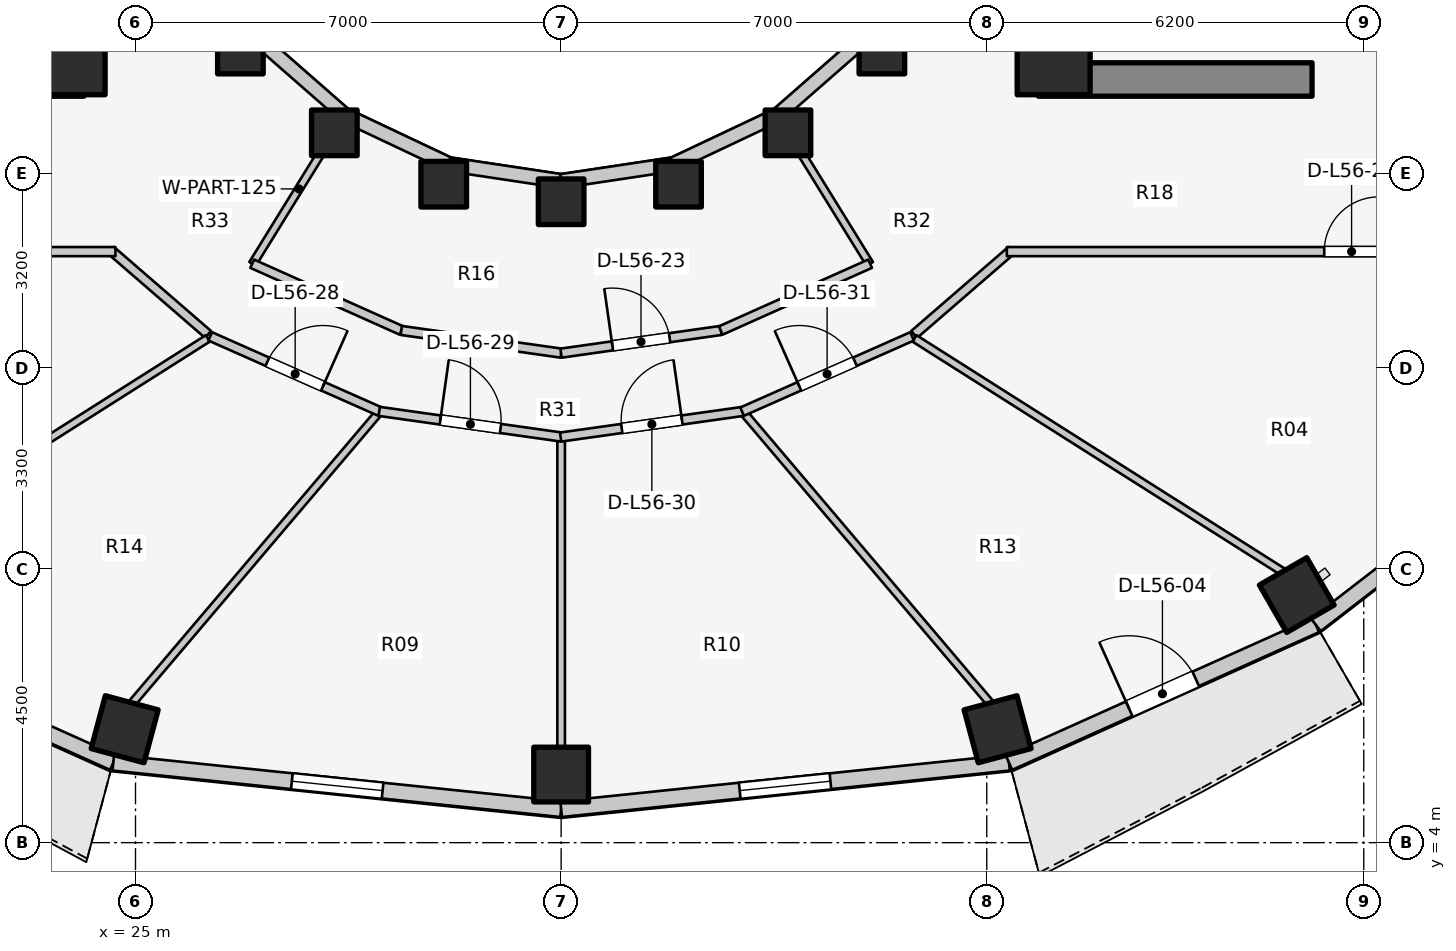
"""IFC4 building model, lengths in metres.
Left out: names, types, materials, properties, quantities, classifications, styles, units other than length and angle.
Written with IfcOpenShell. Run it as: python <this file> out.ifc"""

import sys

from ifc_helpers import new_model, si_unit, direction, frame, frame_2d, origin, origin_2d, place, context, subcontext, project, spatial, rectangle, extrude, element, fill, save


model = new_model("IFC4")
c1 = context("Model", 3, precision=1e-05, world=origin(), true_north=direction((0.0, 1.0)))
c2 = subcontext(c1, "Body", "Model", "MODEL_VIEW")
j1 = project(units=[si_unit("LENGTHUNIT", "METRE"), si_unit("PLANEANGLEUNIT", "RADIAN")], contexts=[c1])
p1 = place(None, origin())
s1 = spatial("IfcSite", under=j1, at=p1, CompositionType="ELEMENT")
p2 = place(p1, origin())
s2 = spatial("IfcBuilding", under=s1, at=p2, CompositionType="ELEMENT")
p3 = place(p2, frame((0.0, 0.0, 183.9)))
s3 = spatial("IfcBuildingStorey", under=s2, at=p3, CompositionType="ELEMENT", Elevation=183.9)
for number, where, z_axis, x_axis in (
    (1, (19.65, 16.55, 0.0), (0.0, 0.0, 1.0), (1.0, 0.0, 0.0)),
    (2, (39.85, 16.55, 0.0), (0.0, 0.0, 1.0), (1.0, 0.0, 0.0)),
):
    element("IfcWall", number, at=place(p3, frame(where, z_axis=z_axis, x_axis=x_axis)), inside=s3, PredefinedType="SHEAR", context=c2, shape_type="SweptSolid", body=[
        extrude(rectangle(XDim=4.5, YDim=0.55, at=frame_2d((2.25, 0.0))), origin(), (0.0, 0.0, 1.0), 3.1),
    ])
for number, where, z_axis, x_axis in (
    (3, (23.9, 16.9, 0.0), (0.0, 0.0, 1.0), (1.0, 0.0, 0.0)),
    (4, (40.1, 16.9, 0.0), (0.0, 0.0, 1.0), (1.0, 0.0, 0.0)),
):
    element("IfcColumn", number, at=place(p3, frame(where, z_axis=z_axis, x_axis=x_axis)), inside=s3, PredefinedType="COLUMN", context=c2, shape_type="SweptSolid", body=[
        extrude(rectangle(XDim=1.2, YDim=1.2, at=origin_2d()), origin(), (0.0, 0.0, 1.0), 3.1),
    ])
for number, where, z_axis, x_axis in (
    (5, (26.725, 17.018, 0.0), (0.0, 0.0, 1.0), (1.0, 0.0, 0.0)),
    (6, (28.27, 15.673, 0.0), (0.0, 0.0, 1.0), (1.0, 0.0, 0.0)),
    (7, (30.069, 14.828, 0.0), (0.0, 0.0, 1.0), (1.0, 0.0, 0.0)),
):
    element("IfcColumn", number, at=place(p3, frame(where, z_axis=z_axis, x_axis=x_axis)), inside=s3, PredefinedType="COLUMN", context=c2, shape_type="SweptSolid", body=[
        extrude(rectangle(XDim=0.75, YDim=0.75, at=origin_2d()), origin(), (0.0, 0.0, 1.0), 3.1),
    ])
p4 = place(p3, frame((24.822, 5.865, 0.0), z_axis=(0.0, 0.0, 1.0), x_axis=(-0.258819045103, -0.965925826289, 0.0)))
e8 = element("IfcColumn", 8, at=p4, inside=s3, PredefinedType="COLUMN", context=c2, shape_type="SweptSolid", body=[
    extrude(rectangle(XDim=0.9, YDim=0.9, at=origin_2d()), origin(), (0.0, 0.0, 1.0), 3.1),
])
p5 = place(p3, frame((32.0, 14.54, 0.0), z_axis=(0.0, 0.0, 1.0), x_axis=(1.0, 0.0, 0.0)))
e9 = element("IfcColumn", 9, at=p5, inside=s3, PredefinedType="COLUMN", context=c2, shape_type="SweptSolid", body=[
    extrude(rectangle(XDim=0.75, YDim=0.75, at=origin_2d()), origin(), (0.0, 0.0, 1.0), 3.1),
])
p6 = place(p3, frame((32.0, 5.12, 0.0), z_axis=(0.0, 0.0, 1.0), x_axis=(0.0, -1.0, 0.0)))
e10 = element("IfcColumn", 10, at=p6, inside=s3, PredefinedType="COLUMN", context=c2, shape_type="SweptSolid", body=[
    extrude(rectangle(XDim=0.9, YDim=0.9, at=origin_2d()), origin(), (0.0, 0.0, 1.0), 3.1),
])
p7 = place(p3, frame((33.931, 14.828, 0.0), z_axis=(0.0, 0.0, 1.0), x_axis=(1.0, 0.0, 0.0)))
e11 = element("IfcColumn", 11, at=p7, inside=s3, PredefinedType="COLUMN", context=c2, shape_type="SweptSolid", body=[
    extrude(rectangle(XDim=0.75, YDim=0.75, at=origin_2d()), origin(), (0.0, 0.0, 1.0), 3.1),
])
p8 = place(p3, frame((39.178, 5.865, 0.0), z_axis=(0.0, 0.0, 1.0), x_axis=(0.258819045103, -0.965925826289, 0.0)))
e12 = element("IfcColumn", 12, at=p8, inside=s3, PredefinedType="COLUMN", context=c2, shape_type="SweptSolid", body=[
    extrude(rectangle(XDim=0.9, YDim=0.9, at=origin_2d()), origin(), (0.0, 0.0, 1.0), 3.1),
])
p9 = place(p3, frame((35.73, 15.673, 0.0), z_axis=(0.0, 0.0, 1.0), x_axis=(1.0, 0.0, 0.0)))
e13 = element("IfcColumn", 13, at=p9, inside=s3, PredefinedType="COLUMN", context=c2, shape_type="SweptSolid", body=[
    extrude(rectangle(XDim=0.75, YDim=0.75, at=origin_2d()), origin(), (0.0, 0.0, 1.0), 3.1),
])
p10 = place(p3, frame((44.098, 8.072, 0.0), z_axis=(0.0, 0.0, 1.0), x_axis=(0.5, -0.866025403784, 0.0)))
e14 = element("IfcColumn", 14, at=p10, inside=s3, PredefinedType="COLUMN", context=c2, shape_type="SweptSolid", body=[
    extrude(rectangle(XDim=0.9, YDim=0.9, at=origin_2d()), origin(), (0.0, 0.0, 1.0), 3.1),
])
p11 = place(p3, frame((37.275, 17.018, 0.0), z_axis=(0.0, 0.0, 1.0), x_axis=(1.0, 0.0, 0.0)))
e15 = element("IfcColumn", 15, at=p11, inside=s3, PredefinedType="COLUMN", context=c2, shape_type="SweptSolid", body=[
    extrude(rectangle(XDim=0.75, YDim=0.75, at=origin_2d()), origin(), (0.0, 0.0, 1.0), 3.1),
])
p12 = place(p3, frame((26.965, 17.258, 0.0), z_axis=(0.0, 0.0, 1.0), x_axis=(0.752576694707, -0.658504607869, 0.0)))
e16 = element("IfcWall", 16, at=p12, inside=s3, PredefinedType="STANDARD", context=c2, shape_type="SweptSolid", body=[
    extrude(rectangle(XDim=1.959, YDim=0.23, at=frame_2d((0.98, 0.0))), origin(), (0.0, 0.0, 1.0), 2.16),
])
p13 = place(p3, frame((28.44, 15.968, 0.0), z_axis=(0.0, 0.0, 1.0), x_axis=(0.904179699603, -0.427152280606, 0.0)))
e17 = element("IfcWall", 17, at=p13, inside=s3, PredefinedType="STANDARD", context=c2, shape_type="SweptSolid", body=[
    extrude(rectangle(XDim=1.899, YDim=0.23, at=frame_2d((0.95, 0.0))), origin(), (0.0, 0.0, 1.0), 2.16),
])
for number, where, z_axis, x_axis in (
    (18, (30.157, 15.157, 0.0), (0.0, 0.0, 1.0), (0.989, -0.149, 0.0)),
    (19, (32.0, 14.88, 0.0), (0.0, 0.0, 1.0), (0.989, 0.149, 0.0)),
):
    element("IfcWall", number, at=place(p3, frame(where, z_axis=z_axis, x_axis=x_axis)), inside=s3, PredefinedType="STANDARD", context=c2, shape_type="SweptSolid", body=[
        extrude(rectangle(XDim=1.864, YDim=0.23, at=frame_2d((0.932, 0.0))), origin(), (0.0, 0.0, 1.0), 2.16),
    ])
p14 = place(p3, frame((33.843, 15.157, 0.0), z_axis=(0.0, 0.0, 1.0), x_axis=(0.904179699603, 0.427152280606, 0.0)))
e20 = element("IfcWall", 20, at=p14, inside=s3, PredefinedType="STANDARD", context=c2, shape_type="SweptSolid", body=[
    extrude(rectangle(XDim=1.899, YDim=0.23, at=frame_2d((0.95, 0.0))), origin(), (0.0, 0.0, 1.0), 2.16),
])
p15 = place(p3, frame((35.56, 15.968, 0.0), z_axis=(0.0, 0.0, 1.0), x_axis=(0.752576694707, 0.658504607869, 0.0)))
e21 = element("IfcWall", 21, at=p15, inside=s3, PredefinedType="STANDARD", context=c2, shape_type="SweptSolid", body=[
    extrude(rectangle(XDim=1.959, YDim=0.23, at=frame_2d((0.98, 0.0))), origin(), (0.0, 0.0, 1.0), 2.16),
])
p16 = place(p3, frame((19.587, 7.581, 0.0), z_axis=(0.0, 0.0, 1.0), x_axis=(0.912353637112, -0.409403029847, 0.0)))
e22 = element("IfcWall", 22, at=p16, inside=s3, PredefinedType="STANDARD", context=c2, shape_type="SweptSolid", body=[
    extrude(rectangle(XDim=5.533, YDim=0.26, at=frame_2d((2.766, 0.0))), origin(), (0.0, 0.0, 1.0), 2.88),
])
p17 = place(p16, frame((2.167, 0.0, 0.0)))
e23 = element("IfcOpeningElement", 23, at=p17, cuts=e22, PredefinedType="OPENING", context=c2, shape_type="SweptSolid", body=[
    extrude(rectangle(XDim=1.2, YDim=2.2, at=frame_2d((0.6, 1.1))), frame((0.0, 0.14, 0.0), z_axis=(0.0, -1.0, 0.0), x_axis=(1.0, 0.0, 0.0)), (0.0, 0.0, 1.0), 0.28),
])
p18 = place(p3, frame((24.635, 5.315, 0.0), z_axis=(0.0, 0.0, 1.0), x_axis=(0.994664178965, -0.10316574569, 0.0)))
e24 = element("IfcWall", 24, at=p18, inside=s3, PredefinedType="STANDARD", context=c2, shape_type="SweptSolid", body=[
    extrude(rectangle(XDim=7.405, YDim=0.26, at=frame_2d((3.702, 0.0))), origin(), (0.0, 0.0, 1.0), 2.85),
])
p19 = place(p18, frame((2.952, 0.0, 0.75)))
e25 = element("IfcOpeningElement", 25, at=p19, cuts=e24, PredefinedType="OPENING", context=c2, shape_type="SweptSolid", body=[
    extrude(rectangle(XDim=1.5, YDim=1.6, at=frame_2d((0.75, 0.8))), frame((0.0, 0.14, 0.0), z_axis=(0.0, -1.0, 0.0), x_axis=(1.0, 0.0, 0.0)), (0.0, 0.0, 1.0), 0.28),
])
p20 = place(p3, frame((32.0, 4.552, 0.0), z_axis=(0.0, 0.0, 1.0), x_axis=(0.994664178965, 0.10316574569, 0.0)))
e26 = element("IfcWall", 26, at=p20, inside=s3, PredefinedType="STANDARD", context=c2, shape_type="SweptSolid", body=[
    extrude(rectangle(XDim=7.405, YDim=0.26, at=frame_2d((3.702, 0.0))), origin(), (0.0, 0.0, 1.0), 2.85),
])
p21 = place(p20, frame((2.952, 0.0, 0.75)))
e27 = element("IfcOpeningElement", 27, at=p21, cuts=e26, PredefinedType="OPENING", context=c2, shape_type="SweptSolid", body=[
    extrude(rectangle(XDim=1.5, YDim=1.6, at=frame_2d((0.75, 0.8))), frame((0.0, 0.14, 0.0), z_axis=(0.0, -1.0, 0.0), x_axis=(1.0, 0.0, 0.0)), (0.0, 0.0, 1.0), 0.28),
])
p22 = place(p3, frame((39.365, 5.315, 0.0), z_axis=(0.0, 0.0, 1.0), x_axis=(0.912353637112, 0.409403029847, 0.0)))
e28 = element("IfcWall", 28, at=p22, inside=s3, PredefinedType="STANDARD", context=c2, shape_type="SweptSolid", body=[
    extrude(rectangle(XDim=5.533, YDim=0.26, at=frame_2d((2.766, 0.0))), origin(), (0.0, 0.0, 1.0), 2.88),
])
p23 = place(p22, frame((2.167, 0.0, 0.0)))
e29 = element("IfcOpeningElement", 29, at=p23, cuts=e28, PredefinedType="OPENING", context=c2, shape_type="SweptSolid", body=[
    extrude(rectangle(XDim=1.2, YDim=2.2, at=frame_2d((0.6, 1.1))), frame((0.0, 0.14, 0.0), z_axis=(0.0, -1.0, 0.0), x_axis=(1.0, 0.0, 0.0)), (0.0, 0.0, 1.0), 0.28),
])
p24 = place(p3, frame((44.413, 7.581, 0.0), z_axis=(0.0, 0.0, 1.0), x_axis=(0.791460185804, 0.611220724687, 0.0)))
e30 = element("IfcWall", 30, at=p24, inside=s3, PredefinedType="STANDARD", context=c2, shape_type="SweptSolid", body=[
    extrude(rectangle(XDim=4.872, YDim=0.26, at=frame_2d((2.436, 0.0))), origin(), (0.0, 0.0, 1.0), 2.85),
])
p25 = place(p3, frame((26.193, 12.358, 0.0), z_axis=(0.0, 0.0, 1.0), x_axis=(-0.756055312247, 0.654507727092, 0.0)))
e31 = element("IfcWall", 31, at=p25, inside=s3, PredefinedType="PARTITIONING", context=c2, shape_type="SweptSolid", body=[
    extrude(rectangle(XDim=2.111, YDim=0.15, at=frame_2d((1.055, 0.0))), origin(), (0.0, 0.0, 1.0), 2.299),
])
p26 = place(p3, frame((17.15, 13.72, 0.0), z_axis=(0.0, 0.0, 1.0), x_axis=(1.0, 0.0, 0.0)))
e32 = element("IfcWall", 32, at=p26, inside=s3, PredefinedType="PARTITIONING", context=c2, shape_type="SweptSolid", body=[
    extrude(rectangle(XDim=7.52, YDim=0.15, at=frame_2d((3.76, 0.0))), origin(), (0.0, 0.0, 1.0), 2.299),
])
p27 = place(p26, frame((1.3, 0.0, 0.0)))
e33 = element("IfcOpeningElement", 33, at=p27, cuts=e32, PredefinedType="OPENING", context=c2, shape_type="SweptSolid", body=[
    extrude(rectangle(XDim=0.9, YDim=2.1, at=frame_2d((0.45, 1.05))), frame((0.0, 0.085, 0.0), z_axis=(0.0, -1.0, 0.0), x_axis=(1.0, 0.0, 0.0)), (0.0, 0.0, 1.0), 0.17),
])
p28 = place(p3, frame((37.807, 12.358, 0.0), z_axis=(0.0, 0.0, 1.0), x_axis=(0.756055312247, 0.654507727092, 0.0)))
e34 = element("IfcWall", 34, at=p28, inside=s3, PredefinedType="PARTITIONING", context=c2, shape_type="SweptSolid", body=[
    extrude(rectangle(XDim=2.111, YDim=0.15, at=frame_2d((1.055, 0.0))), origin(), (0.0, 0.0, 1.0), 2.299),
])
p29 = place(p3, frame((39.33, 13.72, 0.0), z_axis=(0.0, 0.0, 1.0), x_axis=(1.0, 0.0, 0.0)))
e35 = element("IfcWall", 35, at=p29, inside=s3, PredefinedType="PARTITIONING", context=c2, shape_type="SweptSolid", body=[
    extrude(rectangle(XDim=7.52, YDim=0.15, at=frame_2d((3.76, 0.0))), origin(), (0.0, 0.0, 1.0), 2.299),
])
p30 = place(p29, frame((5.22, 0.0, 0.0)))
e36 = element("IfcOpeningElement", 36, at=p30, cuts=e35, PredefinedType="OPENING", context=c2, shape_type="SweptSolid", body=[
    extrude(rectangle(XDim=0.9, YDim=2.1, at=frame_2d((0.45, 1.05))), frame((0.0, 0.085, 0.0), z_axis=(0.0, -1.0, 0.0), x_axis=(1.0, 0.0, 0.0)), (0.0, 0.0, 1.0), 0.17),
])
for number, where, z_axis, x_axis in (
    (37, (28.45, 15.985, 0.0), (0.0, 0.0, 1.0), (-0.526, -0.851, 0.0)),
    (38, (35.55, 15.985, 0.0), (0.0, 0.0, 1.0), (0.526, -0.851, 0.0)),
):
    element("IfcWall", number, at=place(p3, frame(where, z_axis=z_axis, x_axis=x_axis)), inside=s3, PredefinedType="PARTITIONING", context=c2, shape_type="SweptSolid", body=[
        extrude(rectangle(XDim=2.901, YDim=0.125, at=frame_2d((1.451, 0.0))), origin(), (0.0, 0.0, 1.0), 2.299),
    ])
p31 = place(p3, frame((26.919, 13.521, 0.0), z_axis=(0.0, 0.0, 1.0), x_axis=(0.912888568324, -0.408208845842, 0.0)))
e39 = element("IfcWall", 39, at=p31, inside=s3, PredefinedType="PARTITIONING", context=c2, shape_type="SweptSolid", body=[
    extrude(rectangle(XDim=2.69, YDim=0.15, at=frame_2d((1.345, 0.0))), origin(), (0.0, 0.0, 1.0), 2.299),
])
p32 = place(p3, frame((29.371, 12.424, 0.0), z_axis=(0.0, 0.0, 1.0), x_axis=(0.990066775667, -0.1405979364, 0.0)))
e40 = element("IfcWall", 40, at=p32, inside=s3, PredefinedType="PARTITIONING", context=c2, shape_type="SweptSolid", body=[
    extrude(rectangle(XDim=2.657, YDim=0.15, at=frame_2d((1.328, 0.0))), origin(), (0.0, 0.0, 1.0), 2.299),
])
p33 = place(p3, frame((31.998, 12.05, 0.0), z_axis=(0.0, 0.0, 1.0), x_axis=(0.990066775667, 0.1405979364, 0.0)))
e41 = element("IfcWall", 41, at=p33, inside=s3, PredefinedType="PARTITIONING", context=c2, shape_type="SweptSolid", body=[
    extrude(rectangle(XDim=2.657, YDim=0.15, at=frame_2d((1.328, 0.0))), origin(), (0.0, 0.0, 1.0), 2.299),
])
p34 = place(p33, frame((0.854, 0.0, 0.0)))
e42 = element("IfcOpeningElement", 42, at=p34, cuts=e41, PredefinedType="OPENING", context=c2, shape_type="SweptSolid", body=[
    extrude(rectangle(XDim=0.95, YDim=2.1, at=frame_2d((0.475, 1.05))), frame((0.0, 0.085, 0.0), z_axis=(0.0, -1.0, 0.0), x_axis=(1.0, 0.0, 0.0)), (0.0, 0.0, 1.0), 0.17),
])
p35 = place(p3, frame((34.625, 12.423, 0.0), z_axis=(0.0, 0.0, 1.0), x_axis=(0.912888568324, 0.408208845842, 0.0)))
e43 = element("IfcWall", 43, at=p35, inside=s3, PredefinedType="PARTITIONING", context=c2, shape_type="SweptSolid", body=[
    extrude(rectangle(XDim=2.69, YDim=0.15, at=frame_2d((1.345, 0.0))), origin(), (0.0, 0.0, 1.0), 2.299),
])
p36 = place(p3, frame((26.188, 12.292, 0.0), z_axis=(0.0, 0.0, 1.0), x_axis=(-0.844640430122, -0.535334048799, 0.0)))
e44 = element("IfcWall", 44, at=p36, inside=s3, PredefinedType="PARTITIONING", context=c2, shape_type="SweptSolid", body=[
    extrude(rectangle(XDim=7.188, YDim=0.125, at=frame_2d((3.594, 0.0))), origin(), (0.0, 0.0, 1.0), 2.299),
])
p37 = place(p3, frame((28.98, 11.048, 0.0), z_axis=(0.0, 0.0, 1.0), x_axis=(-0.647173462792, -0.762342776615, 0.0)))
e45 = element("IfcWall", 45, at=p37, inside=s3, PredefinedType="PARTITIONING", context=c2, shape_type="SweptSolid", body=[
    extrude(rectangle(XDim=6.253, YDim=0.125, at=frame_2d((3.127, 0.0))), origin(), (0.0, 0.0, 1.0), 2.299),
])
p38 = place(p3, frame((32.0, 10.615, 0.0), z_axis=(0.0, 0.0, 1.0), x_axis=(0.0, -1.0, 0.0)))
e46 = element("IfcWall", 46, at=p38, inside=s3, PredefinedType="PARTITIONING", context=c2, shape_type="SweptSolid", body=[
    extrude(rectangle(XDim=5.065, YDim=0.125, at=frame_2d((2.532, 0.0))), origin(), (0.0, 0.0, 1.0), 2.299),
])
p39 = place(p3, frame((35.02, 11.048, 0.0), z_axis=(0.0, 0.0, 1.0), x_axis=(0.647173462792, -0.762342776615, 0.0)))
e47 = element("IfcWall", 47, at=p39, inside=s3, PredefinedType="PARTITIONING", context=c2, shape_type="SweptSolid", body=[
    extrude(rectangle(XDim=6.253, YDim=0.125, at=frame_2d((3.127, 0.0))), origin(), (0.0, 0.0, 1.0), 2.299),
])
p40 = place(p3, frame((37.812, 12.292, 0.0), z_axis=(0.0, 0.0, 1.0), x_axis=(0.844640430122, -0.535334048799, 0.0)))
e48 = element("IfcWall", 48, at=p40, inside=s3, PredefinedType="PARTITIONING", context=c2, shape_type="SweptSolid", body=[
    extrude(rectangle(XDim=7.188, YDim=0.125, at=frame_2d((3.594, 0.0))), origin(), (0.0, 0.0, 1.0), 2.299),
])
p41 = place(p3, frame((26.228, 12.326, 0.0), z_axis=(0.0, 0.0, 1.0), x_axis=(0.914324470734, -0.404982422108, 0.0)))
e49 = element("IfcWall", 49, at=p41, inside=s3, PredefinedType="PARTITIONING", context=c2, shape_type="SweptSolid", body=[
    extrude(rectangle(XDim=3.058, YDim=0.15, at=frame_2d((1.529, 0.0))), origin(), (0.0, 0.0, 1.0), 2.299),
])
p42 = place(p41, frame((1.029, 0.0, 0.0)))
e50 = element("IfcOpeningElement", 50, at=p42, cuts=e49, PredefinedType="OPENING", context=c2, shape_type="SweptSolid", body=[
    extrude(rectangle(XDim=1.0, YDim=2.1, at=frame_2d((0.5, 1.05))), frame((0.0, 0.085, 0.0), z_axis=(0.0, -1.0, 0.0), x_axis=(1.0, 0.0, 0.0)), (0.0, 0.0, 1.0), 0.17),
])
p43 = place(p3, frame((29.008, 11.092, 0.0), z_axis=(0.0, 0.0, 1.0), x_axis=(0.990234341072, -0.139412875167, 0.0)))
e51 = element("IfcWall", 51, at=p43, inside=s3, PredefinedType="PARTITIONING", context=c2, shape_type="SweptSolid", body=[
    extrude(rectangle(XDim=3.03, YDim=0.15, at=frame_2d((1.515, 0.0))), origin(), (0.0, 0.0, 1.0), 2.299),
])
p44 = place(p43, frame((1.015, 0.0, 0.0)))
e52 = element("IfcOpeningElement", 52, at=p44, cuts=e51, PredefinedType="OPENING", context=c2, shape_type="SweptSolid", body=[
    extrude(rectangle(XDim=1.0, YDim=2.1, at=frame_2d((0.5, 1.05))), frame((0.0, 0.085, 0.0), z_axis=(0.0, -1.0, 0.0), x_axis=(1.0, 0.0, 0.0)), (0.0, 0.0, 1.0), 0.17),
])
p45 = place(p3, frame((31.992, 10.67, 0.0), z_axis=(0.0, 0.0, 1.0), x_axis=(0.990234341072, 0.139412875167, 0.0)))
e53 = element("IfcWall", 53, at=p45, inside=s3, PredefinedType="PARTITIONING", context=c2, shape_type="SweptSolid", body=[
    extrude(rectangle(XDim=3.03, YDim=0.15, at=frame_2d((1.515, 0.0))), origin(), (0.0, 0.0, 1.0), 2.299),
])
p46 = place(p45, frame((1.015, 0.0, 0.0)))
e54 = element("IfcOpeningElement", 54, at=p46, cuts=e53, PredefinedType="OPENING", context=c2, shape_type="SweptSolid", body=[
    extrude(rectangle(XDim=1.0, YDim=2.1, at=frame_2d((0.5, 1.05))), frame((0.0, 0.085, 0.0), z_axis=(0.0, -1.0, 0.0), x_axis=(1.0, 0.0, 0.0)), (0.0, 0.0, 1.0), 0.17),
])
p47 = place(p3, frame((34.976, 11.088, 0.0), z_axis=(0.0, 0.0, 1.0), x_axis=(0.914324470734, 0.404982422108, 0.0)))
e55 = element("IfcWall", 55, at=p47, inside=s3, PredefinedType="PARTITIONING", context=c2, shape_type="SweptSolid", body=[
    extrude(rectangle(XDim=3.058, YDim=0.15, at=frame_2d((1.529, 0.0))), origin(), (0.0, 0.0, 1.0), 2.299),
])
p48 = place(p47, frame((1.029, 0.0, 0.0)))
e56 = element("IfcOpeningElement", 56, at=p48, cuts=e55, PredefinedType="OPENING", context=c2, shape_type="SweptSolid", body=[
    extrude(rectangle(XDim=1.0, YDim=2.1, at=frame_2d((0.5, 1.05))), frame((0.0, 0.085, 0.0), z_axis=(0.0, -1.0, 0.0), x_axis=(1.0, 0.0, 0.0)), (0.0, 0.0, 1.0), 0.17),
])
p49 = place(p19, origin())
e57 = element("IfcWindow", 57, at=p49, inside=s3, PartitioningType="SINGLE_PANEL", PredefinedType="WINDOW", context=c2, shape_type="SweptSolid", body=[
    extrude(rectangle(XDim=1.5, YDim=1.6, at=frame_2d((0.75, 0.8))), frame((0.0, 0.03, 0.0), z_axis=(0.0, -1.0, 0.0), x_axis=(1.0, 0.0, 0.0)), (0.0, 0.0, 1.0), 0.06),
])
fill(e25, e57)
p50 = place(p21, origin())
e58 = element("IfcWindow", 58, at=p50, inside=s3, PartitioningType="SINGLE_PANEL", PredefinedType="WINDOW", context=c2, shape_type="SweptSolid", body=[
    extrude(rectangle(XDim=1.5, YDim=1.6, at=frame_2d((0.75, 0.8))), frame((0.0, 0.03, 0.0), z_axis=(0.0, -1.0, 0.0), x_axis=(1.0, 0.0, 0.0)), (0.0, 0.0, 1.0), 0.06),
])
fill(e27, e58)
p51 = place(p23, origin())
e59 = element("IfcDoor", 59, at=p51, inside=s3, OperationType="SINGLE_SWING_LEFT", PredefinedType="DOOR", context=c2, shape_type="SweptSolid", body=[
    extrude(rectangle(XDim=1.2, YDim=2.2, at=frame_2d((0.6, 1.1))), frame((0.0, 0.025, 0.0), z_axis=(0.0, -1.0, 0.0), x_axis=(1.0, 0.0, 0.0)), (0.0, 0.0, 1.0), 0.05),
])
fill(e29, e59)
p52 = place(p30, origin())
e60 = element("IfcDoor", 60, at=p52, inside=s3, OperationType="SINGLE_SWING_RIGHT", PredefinedType="DOOR", context=c2, shape_type="SweptSolid", body=[
    extrude(rectangle(XDim=0.9, YDim=2.1, at=frame_2d((0.45, 1.05))), frame((0.0, 0.025, 0.0), z_axis=(0.0, -1.0, 0.0), x_axis=(1.0, 0.0, 0.0)), (0.0, 0.0, 1.0), 0.05),
])
fill(e36, e60)
p53 = place(p34, origin())
e61 = element("IfcDoor", 61, at=p53, inside=s3, OperationType="SINGLE_SWING_LEFT", PredefinedType="DOOR", context=c2, shape_type="SweptSolid", body=[
    extrude(rectangle(XDim=0.95, YDim=2.1, at=frame_2d((0.475, 1.05))), frame((0.0, 0.025, 0.0), z_axis=(0.0, -1.0, 0.0), x_axis=(1.0, 0.0, 0.0)), (0.0, 0.0, 1.0), 0.05),
])
fill(e42, e61)
p54 = place(p42, origin())
e62 = element("IfcDoor", 62, at=p54, inside=s3, OperationType="SINGLE_SWING_RIGHT", PredefinedType="DOOR", context=c2, shape_type="SweptSolid", body=[
    extrude(rectangle(XDim=1.0, YDim=2.1, at=frame_2d((0.5, 1.05))), frame((0.0, 0.025, 0.0), z_axis=(0.0, -1.0, 0.0), x_axis=(1.0, 0.0, 0.0)), (0.0, 0.0, 1.0), 0.05),
])
fill(e50, e62)
p55 = place(p44, origin())
e63 = element("IfcDoor", 63, at=p55, inside=s3, OperationType="SINGLE_SWING_LEFT", PredefinedType="DOOR", context=c2, shape_type="SweptSolid", body=[
    extrude(rectangle(XDim=1.0, YDim=2.1, at=frame_2d((0.5, 1.05))), frame((0.0, 0.025, 0.0), z_axis=(0.0, -1.0, 0.0), x_axis=(1.0, 0.0, 0.0)), (0.0, 0.0, 1.0), 0.05),
])
fill(e52, e63)
p56 = place(p46, origin())
e64 = element("IfcDoor", 64, at=p56, inside=s3, OperationType="SINGLE_SWING_RIGHT", PredefinedType="DOOR", context=c2, shape_type="SweptSolid", body=[
    extrude(rectangle(XDim=1.0, YDim=2.1, at=frame_2d((0.5, 1.05))), frame((0.0, 0.025, 0.0), z_axis=(0.0, -1.0, 0.0), x_axis=(1.0, 0.0, 0.0)), (0.0, 0.0, 1.0), 0.05),
])
fill(e54, e64)
p57 = place(p48, origin())
e65 = element("IfcDoor", 65, at=p57, inside=s3, OperationType="SINGLE_SWING_LEFT", PredefinedType="DOOR", context=c2, shape_type="SweptSolid", body=[
    extrude(rectangle(XDim=1.0, YDim=2.1, at=frame_2d((0.5, 1.05))), frame((0.0, 0.025, 0.0), z_axis=(0.0, -1.0, 0.0), x_axis=(1.0, 0.0, 0.0)), (0.0, 0.0, 1.0), 0.05),
])
fill(e56, e65)
save(model, sys.argv[1])
